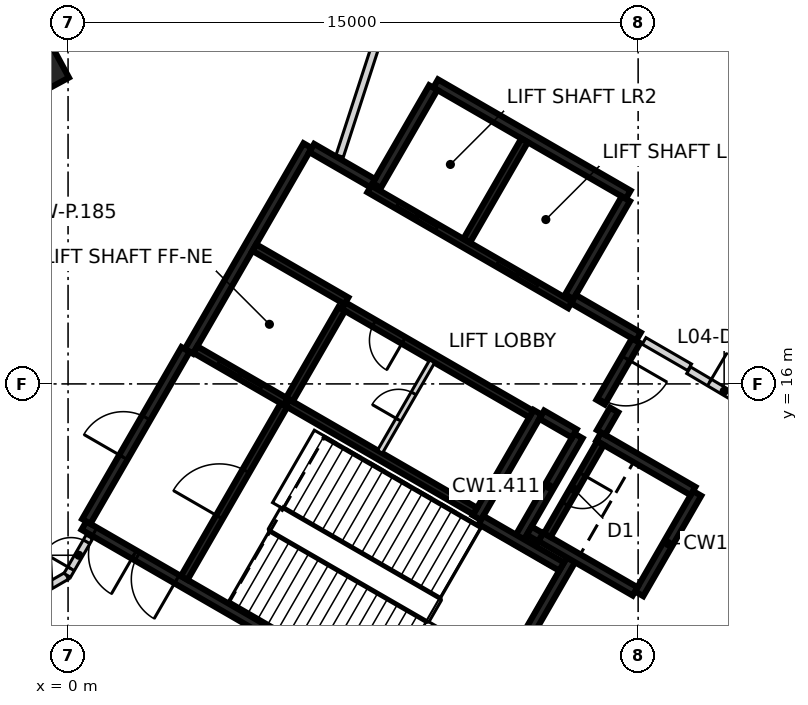
"""IFC4 building model, lengths in metres.
Left out: names, types, materials, properties, quantities, classifications, styles, units other than length and angle.
Written with IfcOpenShell. Run it as: python <this file> out.ifc"""

import sys

from ifc_helpers import new_model, si_unit, direction, frame, frame_2d, origin, origin_2d, place, context, subcontext, project, spatial, rectangle, extrude, element, fill, save


model = new_model("IFC4")
c1 = context("Model", 3, precision=1e-05, world=origin(), true_north=direction((0.0, 1.0)))
c2 = subcontext(c1, "Body", "Model", "MODEL_VIEW")
j1 = project(units=[si_unit("LENGTHUNIT", "METRE"), si_unit("PLANEANGLEUNIT", "RADIAN")], contexts=[c1])
p1 = place(None, origin())
s1 = spatial("IfcSite", under=j1, at=p1, CompositionType="ELEMENT")
p2 = place(p1, origin())
s2 = spatial("IfcBuilding", under=s1, at=p2, CompositionType="ELEMENT")
p3 = place(p2, frame((0.0, 0.0, 24.5)))
s3 = spatial("IfcBuildingStorey", under=s2, at=p3, CompositionType="ELEMENT", Elevation=24.5)
p4 = place(p3, frame((-1.197, 24.423, -0.45), z_axis=(0.0, 0.0, 1.0), x_axis=(-0.476198301069, 0.879337920289, 0.0)))
e1 = element("IfcColumn", 1, at=p4, inside=s3, PredefinedType="COLUMN", context=c2, shape_type="SweptSolid", body=[
    extrude(rectangle(XDim=1.8, YDim=1.8, at=origin_2d()), origin(), (0.0, 0.0, 1.0), 5.05),
])
p5 = place(p3, frame((10.42, 6.498, 0.0), z_axis=(0.0, 0.0, 1.0), x_axis=(-0.866021906294, 0.500006057782, 0.0)))
e2 = element("IfcWall", 2, at=p5, inside=s3, PredefinedType="SHEAR", context=c2, shape_type="SweptSolid", body=[
    extrude(rectangle(XDim=11.55, YDim=0.25, at=frame_2d((5.775, 0.0))), origin(), (0.0, 0.0, 1.0), 4.6),
])
p6 = place(p5, frame((10.025, 0.0, 0.0)))
e3 = element("IfcOpeningElement", 3, at=p6, cuts=e2, PredefinedType="OPENING", context=c2, shape_type="SweptSolid", body=[
    extrude(rectangle(XDim=1.2, YDim=2.1, at=frame_2d((0.6, 1.05))), frame((0.0, 0.135, 0.0), z_axis=(0.0, -1.0, 0.0), x_axis=(1.0, 0.0, 0.0)), (0.0, 0.0, 1.0), 0.27),
])
p7 = place(p5, frame((8.725, 0.0, 0.0)))
e4 = element("IfcOpeningElement", 4, at=p7, cuts=e2, PredefinedType="OPENING", context=c2, shape_type="SweptSolid", body=[
    extrude(rectangle(XDim=1.2, YDim=2.1, at=frame_2d((0.6, 1.05))), frame((0.0, 0.135, 0.0), z_axis=(0.0, -1.0, 0.0), x_axis=(1.0, 0.0, 0.0)), (0.0, 0.0, 1.0), 0.27),
])
p8 = place(p3, frame((3.179, 16.856, 0.0), z_axis=(0.0, 0.0, 1.0), x_axis=(0.500004234368, 0.866022959057, 0.0)))
e5 = element("IfcWall", 5, at=p8, inside=s3, PredefinedType="SHEAR", context=c2, shape_type="SweptSolid", body=[
    extrude(rectangle(XDim=6.25, YDim=0.25, at=frame_2d((3.125, 0.0))), origin(), (0.0, 0.0, 1.0), 4.6),
])
p9 = place(p3, frame((9.673, 23.903, 0.0), z_axis=(0.0, 0.0, 1.0), x_axis=(0.86603616409, -0.499981362141, 0.0)))
e6 = element("IfcWall", 6, at=p9, inside=s3, PredefinedType="SHEAR", context=c2, shape_type="SweptSolid", body=[
    extrude(rectangle(XDim=5.85, YDim=0.25, at=frame_2d((2.925, 0.0))), origin(), (0.0, 0.0, 1.0), 4.6),
])
p10 = place(p3, frame((0.48, 12.381, 0.0), z_axis=(0.0, 0.0, 1.0), x_axis=(0.49999885962, 0.866026062182, 0.0)))
e7 = element("IfcWall", 7, at=p10, inside=s3, PredefinedType="SHEAR", context=c2, shape_type="SweptSolid", body=[
    extrude(rectangle(XDim=5.225, YDim=0.25, at=frame_2d((2.612, 0.0))), origin(), (0.0, 0.0, 1.0), 4.6),
])
p11 = place(p10, frame((1.95, 0.0, 0.0)))
e8 = element("IfcOpeningElement", 8, at=p11, cuts=e7, PredefinedType="OPENING", context=c2, shape_type="SweptSolid", body=[
    extrude(rectangle(XDim=1.2, YDim=2.1, at=frame_2d((0.6, 1.05))), frame((0.0, 0.135, 0.0), z_axis=(0.0, -1.0, 0.0), x_axis=(1.0, 0.0, 0.0)), (0.0, 0.0, 1.0), 0.27),
])
p12 = place(p3, frame((13.238, 11.378, 0.0), z_axis=(0.0, 0.0, 1.0), x_axis=(-0.500008851346, -0.866020293397, 0.0)))
e9 = element("IfcWall", 9, at=p12, inside=s3, PredefinedType="SHEAR", context=c2, shape_type="SweptSolid", body=[
    extrude(rectangle(XDim=5.51, YDim=0.25, at=frame_2d((2.755, 0.0))), origin(), (0.0, 0.0, 1.0), 4.6),
])
p13 = place(p3, frame((12.357, 15.252, 0.0), z_axis=(0.0, 0.0, 1.0), x_axis=(-0.500028443584, -0.866008981251, 0.0)))
e10 = element("IfcWall", 10, at=p13, inside=s3, PredefinedType="SHEAR", context=c2, shape_type="SweptSolid", body=[
    extrude(rectangle(XDim=3.2, YDim=0.25, at=frame_2d((1.6, 0.0))), origin(), (0.0, 0.0, 1.0), 4.6),
])
for number, where, z_axis, x_axis in (
    (11, (8.123, 21.219, 0.0), (0.0, 0.0, 1.0), (0.5, 0.866, 0.0)),
    (12, (14.676, 20.87, 0.0), (0.0, 0.0, 1.0), (-0.5, -0.866, 0.0)),
):
    element("IfcWall", number, at=place(p3, frame(where, z_axis=z_axis, x_axis=x_axis)), inside=s3, PredefinedType="SHEAR", context=c2, shape_type="SweptSolid", body=[
        extrude(rectangle(XDim=2.975, YDim=0.25, at=frame_2d((1.487, 0.0))), origin(), (0.0, 0.0, 1.0), 4.6),
    ])
p14 = place(p3, frame((16.552, 13.119, 0.0), z_axis=(0.0, 0.0, 1.0), x_axis=(-0.499978833458, -0.866037623948, 0.0)))
e13 = element("IfcWall", 13, at=p14, inside=s3, PredefinedType="SHEAR", context=c2, shape_type="SweptSolid", body=[
    extrude(rectangle(XDim=3.05, YDim=0.25, at=frame_2d((1.525, 0.0))), origin(), (0.0, 0.0, 1.0), 4.6),
])
p15 = place(p3, frame((14.918, 10.54, 0.0), z_axis=(0.0, 0.0, 1.0), x_axis=(-0.866063538972, 0.499933942099, 0.0)))
e14 = element("IfcWall", 14, at=p15, inside=s3, PredefinedType="SHEAR", context=c2, shape_type="SweptSolid", body=[
    extrude(rectangle(XDim=2.865, YDim=0.25, at=frame_2d((1.432, 0.0))), origin(), (0.0, 0.0, 1.0), 4.6),
])
p16 = place(p3, frame((13.963, 14.614, 0.0), z_axis=(0.0, 0.0, 1.0), x_axis=(0.866042235819, -0.499970844928, 0.0)))
e15 = element("IfcWall", 15, at=p16, inside=s3, PredefinedType="SHEAR", context=c2, shape_type="SweptSolid", body=[
    extrude(rectangle(XDim=2.865, YDim=0.25, at=frame_2d((1.432, 0.0))), origin(), (0.0, 0.0, 1.0), 4.6),
])
p17 = place(p3, frame((11.888, 11.961, 0.0), z_axis=(0.0, 0.0, 1.0), x_axis=(0.500003324108, 0.866023484601, 0.0)))
e16 = element("IfcWall", 16, at=p17, inside=s3, PredefinedType="SHEAR", context=c2, shape_type="SweptSolid", body=[
    extrude(rectangle(XDim=3.085, YDim=0.25, at=frame_2d((1.542, 0.0))), origin(), (0.0, 0.0, 1.0), 4.6),
])
p18 = place(p3, frame((10.865, 12.418, 0.0), z_axis=(0.0, 0.0, 1.0), x_axis=(0.866026229868, -0.499998569178, 0.0)))
e17 = element("IfcWall", 17, at=p18, inside=s3, PredefinedType="SHEAR", context=c2, shape_type="SweptSolid", body=[
    extrude(rectangle(XDim=2.449, YDim=0.25, at=frame_2d((1.225, 0.0))), origin(), (0.0, 0.0, 1.0), 4.6),
])
p19 = place(p3, frame((13.297, 18.231, 0.0), z_axis=(0.0, 0.0, 1.0), x_axis=(0.866043531843, -0.499968599967, 0.0)))
e18 = element("IfcWall", 18, at=p19, inside=s3, PredefinedType="SHEAR", context=c2, shape_type="SweptSolid", body=[
    extrude(rectangle(XDim=1.975, YDim=0.25, at=frame_2d((0.987, 0.0))), origin(), (0.0, 0.0, 1.0), 4.6),
])
p20 = place(p3, frame((6.413, 22.206, 0.0), z_axis=(0.0, 0.0, 1.0), x_axis=(0.866016279763, -0.500015802937, 0.0)))
e19 = element("IfcWall", 19, at=p20, inside=s3, PredefinedType="SHEAR", context=c2, shape_type="SweptSolid", body=[
    extrude(rectangle(XDim=1.849, YDim=0.25, at=frame_2d((0.925, 0.0))), origin(), (0.0, 0.0, 1.0), 4.6),
])
p21 = place(p3, frame((14.945, 17.135, 0.0), z_axis=(0.0, 0.0, 1.0), x_axis=(-0.499983108224, -0.866035156036, 0.0)))
e20 = element("IfcWall", 20, at=p21, inside=s3, PredefinedType="SHEAR", context=c2, shape_type="SweptSolid", body=[
    extrude(rectangle(XDim=1.865, YDim=0.25, at=frame_2d((0.932, 0.0))), origin(), (0.0, 0.0, 1.0), 4.6),
])
p22 = place(p21, frame((0.535, 0.0, 0.0)))
e21 = element("IfcOpeningElement", 21, at=p22, cuts=e20, PredefinedType="OPENING", context=c2, shape_type="SweptSolid", body=[
    extrude(rectangle(XDim=1.25, YDim=2.1, at=frame_2d((0.625, 1.05))), frame((0.0, 0.135, 0.0), z_axis=(0.0, -1.0, 0.0), x_axis=(1.0, 0.0, 0.0)), (0.0, 0.0, 1.0), 0.27),
])
p23 = place(p3, frame((13.322, 14.695, 0.0), z_axis=(0.0, 0.0, 1.0), x_axis=(-0.866017078145, 0.500014420154, 0.0)))
e22 = element("IfcWall", 22, at=p23, inside=s3, PredefinedType="SHEAR", context=c2, shape_type="SweptSolid", body=[
    extrude(rectangle(XDim=0.989, YDim=0.25, at=frame_2d((0.495, 0.0))), origin(), (0.0, 0.0, 1.0), 4.6),
])
p24 = place(p3, frame((14.368, 15.315, 0.0), z_axis=(0.0, 0.0, 1.0), x_axis=(-0.499897359611, -0.866084655132, 0.0)))
e23 = element("IfcWall", 23, at=p24, inside=s3, PredefinedType="SHEAR", context=c2, shape_type="SweptSolid", body=[
    extrude(rectangle(XDim=0.685, YDim=0.25, at=frame_2d((0.342, 0.0))), origin(), (0.0, 0.0, 1.0), 4.6),
])
p25 = place(p3, frame((12.433, 11.964, 0.0), z_axis=(0.0, 0.0, 1.0), x_axis=(-0.866055875208, 0.499947218231, 0.0)))
e24 = element("IfcWall", 24, at=p25, inside=s3, PredefinedType="SHEAR", context=c2, shape_type="SweptSolid", body=[
    extrude(rectangle(XDim=0.345, YDim=0.25, at=frame_2d((0.172, 0.0))), origin(), (0.0, 0.0, 1.0), 4.6),
])
p26 = place(p3, frame((13.21, 18.08, 0.0), z_axis=(0.0, 0.0, 1.0), x_axis=(-0.866030299012, 0.499991521122, 0.0)))
e25 = element("IfcWall", 25, at=p26, inside=s3, PredefinedType="SHEAR", context=c2, shape_type="SweptSolid", body=[
    extrude(rectangle(XDim=6.1, YDim=0.2, at=frame_2d((3.05, 0.0))), origin(), (0.0, 0.0, 1.0), 4.6),
])
p27 = place(p26, frame((1.0, 0.0, 0.0)))
e26 = element("IfcOpeningElement", 26, at=p27, cuts=e25, PredefinedType="OPENING", context=c2, shape_type="SweptSolid", body=[
    extrude(rectangle(XDim=1.2, YDim=2.1, at=frame_2d((0.6, 1.05))), frame((0.0, 0.11, 0.0), z_axis=(0.0, -1.0, 0.0), x_axis=(1.0, 0.0, 0.0)), (0.0, 0.0, 1.0), 0.22),
])
p28 = place(p26, frame((4.05, 0.0, 0.0)))
e27 = element("IfcOpeningElement", 27, at=p28, cuts=e25, PredefinedType="OPENING", context=c2, shape_type="SweptSolid", body=[
    extrude(rectangle(XDim=1.2, YDim=2.1, at=frame_2d((0.6, 1.05))), frame((0.0, 0.11, 0.0), z_axis=(0.0, -1.0, 0.0), x_axis=(1.0, 0.0, 0.0)), (0.0, 0.0, 1.0), 0.22),
])
p29 = place(p3, frame((5.775, 15.502, 0.0), z_axis=(0.0, 0.0, 1.0), x_axis=(0.866020080793, -0.500009219579, 0.0)))
e28 = element("IfcWall", 28, at=p29, inside=s3, PredefinedType="SHEAR", context=c2, shape_type="SweptSolid", body=[
    extrude(rectangle(XDim=5.699, YDim=0.2, at=frame_2d((2.85, 0.0))), origin(), (0.0, 0.0, 1.0), 4.6),
])
p30 = place(p3, frame((12.185, 15.207, 0.0), z_axis=(0.0, 0.0, 1.0), x_axis=(-0.866020080793, 0.500009219579, 0.0)))
e29 = element("IfcWall", 29, at=p30, inside=s3, PredefinedType="SHEAR", context=c2, shape_type="SweptSolid", body=[
    extrude(rectangle(XDim=5.699, YDim=0.2, at=frame_2d((2.85, 0.0))), origin(), (0.0, 0.0, 1.0), 4.6),
])
p31 = place(p30, frame((3.874, 0.0, 0.0)))
e30 = element("IfcOpeningElement", 30, at=p31, cuts=e29, PredefinedType="OPENING", context=c2, shape_type="SweptSolid", body=[
    extrude(rectangle(XDim=0.9, YDim=2.1, at=frame_2d((0.45, 1.05))), frame((0.0, 0.11, 0.0), z_axis=(0.0, -1.0, 0.0), x_axis=(1.0, 0.0, 0.0)), (0.0, 0.0, 1.0), 0.22),
])
p32 = place(p3, frame((3.057, 10.895, 0.0), z_axis=(0.0, 0.0, 1.0), x_axis=(0.499989418164, 0.866031513124, 0.0)))
e31 = element("IfcWall", 31, at=p32, inside=s3, PredefinedType="SHEAR", context=c2, shape_type="SweptSolid", body=[
    extrude(rectangle(XDim=5.251, YDim=0.2, at=frame_2d((2.625, 0.0))), origin(), (0.0, 0.0, 1.0), 4.6),
])
p33 = place(p32, frame((1.849, 0.0, 0.0)))
e32 = element("IfcOpeningElement", 32, at=p33, cuts=e31, PredefinedType="OPENING", context=c2, shape_type="SweptSolid", body=[
    extrude(rectangle(XDim=1.4, YDim=2.1, at=frame_2d((0.7, 1.05))), frame((0.0, 0.11, 0.0), z_axis=(0.0, -1.0, 0.0), x_axis=(1.0, 0.0, 0.0)), (0.0, 0.0, 1.0), 0.22),
])
p34 = place(p3, frame((10.489, 19.767, 0.0), z_axis=(0.0, 0.0, 1.0), x_axis=(0.499946628782, 0.866056215479, 0.0)))
e33 = element("IfcWall", 33, at=p34, inside=s3, PredefinedType="SHEAR", context=c2, shape_type="SweptSolid", body=[
    extrude(rectangle(XDim=3.048, YDim=0.2, at=frame_2d((1.524, 0.0))), origin(), (0.0, 0.0, 1.0), 4.6),
])
p35 = place(p3, frame((14.008, 14.442, 0.0), z_axis=(0.0, 0.0, 1.0), x_axis=(-0.499986818241, -0.866033014143, 0.0)))
e34 = element("IfcWall", 34, at=p35, inside=s3, PredefinedType="SHEAR", context=c2, shape_type="SweptSolid", body=[
    extrude(rectangle(XDim=2.798, YDim=0.2, at=frame_2d((1.399, 0.0))), origin(), (0.0, 0.0, 1.0), 4.6),
])
p36 = place(p35, frame((0.949, 0.0, 0.0)))
e35 = element("IfcOpeningElement", 35, at=p36, cuts=e34, PredefinedType="OPENING", context=c2, shape_type="SweptSolid", body=[
    extrude(rectangle(XDim=0.9, YDim=2.1, at=frame_2d((0.45, 1.05))), frame((0.0, 0.11, 0.0), z_axis=(0.0, -1.0, 0.0), x_axis=(1.0, 0.0, 0.0)), (0.0, 0.0, 1.0), 0.22),
])
p37 = place(p3, frame((7.199, 17.97, 0.0), z_axis=(0.0, 0.0, 1.0), x_axis=(-0.499968400327, -0.866043647095, 0.0)))
e36 = element("IfcWall", 36, at=p37, inside=s3, PredefinedType="SHEAR", context=c2, shape_type="SweptSolid", body=[
    extrude(rectangle(XDim=2.75, YDim=0.2, at=frame_2d((1.375, 0.0))), origin(), (0.0, 0.0, 1.0), 4.6),
])
p38 = place(p3, frame((5.725, 15.531, 0.0), z_axis=(0.0, 0.0, 1.0), x_axis=(-0.866037306777, 0.499979382845, 0.0)))
e37 = element("IfcWall", 37, at=p38, inside=s3, PredefinedType="SHEAR", context=c2, shape_type="SweptSolid", body=[
    extrude(rectangle(XDim=2.742, YDim=0.2, at=frame_2d((1.371, 0.0))), origin(), (0.0, 0.0, 1.0), 4.6),
])
p39 = place(p38, frame((0.743, 0.0, 0.0)))
e38 = element("IfcOpeningElement", 38, at=p39, cuts=e37, PredefinedType="OPENING", context=c2, shape_type="SweptSolid", body=[
    extrude(rectangle(XDim=1.3, YDim=2.1, at=frame_2d((0.65, 1.05))), frame((0.0, 0.11, 0.0), z_axis=(0.0, -1.0, 0.0), x_axis=(1.0, 0.0, 0.0)), (0.0, 0.0, 1.0), 0.22),
])
p40 = place(p3, frame((4.901, 19.586, 0.0), z_axis=(0.0, 0.0, 1.0), x_axis=(0.866022890907, -0.500004352405, 0.0)))
e39 = element("IfcWall", 39, at=p40, inside=s3, PredefinedType="SHEAR", context=c2, shape_type="SweptSolid", body=[
    extrude(rectangle(XDim=2.799, YDim=0.2, at=frame_2d((1.399, 0.0))), origin(), (0.0, 0.0, 1.0), 4.6),
])
p41 = place(p3, frame((8.207, 14.214, 0.0), z_axis=(0.0, 0.0, 1.0), x_axis=(0.499922376475, 0.866070215109, 0.0)))
e40 = element("IfcWall", 40, at=p41, inside=s3, PredefinedType="PARTITIONING", context=c2, shape_type="SweptSolid", body=[
    extrude(rectangle(XDim=2.749, YDim=0.15, at=frame_2d((1.374, 0.0))), origin(), (0.0, 0.0, 1.0), 4.6),
])
p42 = place(p41, frame((0.974, 0.0, 0.0)))
e41 = element("IfcOpeningElement", 41, at=p42, cuts=e40, PredefinedType="OPENING", context=c2, shape_type="SweptSolid", body=[
    extrude(rectangle(XDim=0.8, YDim=2.1, at=frame_2d((0.4, 1.05))), frame((0.0, 0.085, 0.0), z_axis=(0.0, -1.0, 0.0), x_axis=(1.0, 0.0, 0.0)), (0.0, 0.0, 1.0), 0.17),
])
p43 = place(p3, frame((-8.026, 6.338, 0.0), z_axis=(0.0, 0.0, 1.0), x_axis=(0.866102328946, 0.499866738036, 0.0)))
e42 = element("IfcWall", 42, at=p43, inside=s3, PredefinedType="PARTITIONING", context=c2, shape_type="SweptSolid", body=[
    extrude(rectangle(XDim=9.228, YDim=0.2, at=frame_2d((4.614, 0.0))), origin(), (0.0, 0.0, 1.0), 4.6),
])
p44 = place(p43, frame((6.56, 0.0, 0.0)))
e43 = element("IfcOpeningElement", 43, at=p44, cuts=e42, PredefinedType="OPENING", context=c2, shape_type="SweptSolid", body=[
    extrude(rectangle(XDim=1.0, YDim=2.1, at=frame_2d((0.5, 1.05))), frame((0.0, 0.11, 0.0), z_axis=(0.0, -1.0, 0.0), x_axis=(1.0, 0.0, 0.0)), (0.0, 0.0, 1.0), 0.22),
])
p45 = place(p43, frame((3.331, 0.0, 0.0)))
e44 = element("IfcOpeningElement", 44, at=p45, cuts=e42, PredefinedType="OPENING", context=c2, shape_type="SweptSolid", body=[
    extrude(rectangle(XDim=0.9, YDim=2.1, at=frame_2d((0.45, 1.05))), frame((0.0, 0.11, 0.0), z_axis=(0.0, -1.0, 0.0), x_axis=(1.0, 0.0, 0.0)), (0.0, 0.0, 1.0), 0.22),
])
p46 = place(p3, frame((-0.022, 10.963, 0.0), z_axis=(0.0, 0.0, 1.0), x_axis=(0.499463335884, 0.866335025327, 0.0)))
e45 = element("IfcWall", 45, at=p46, inside=s3, PredefinedType="PARTITIONING", context=c2, shape_type="SweptSolid", body=[
    extrude(rectangle(XDim=1.169, YDim=0.2, at=frame_2d((0.584, 0.0))), origin(), (0.0, 0.0, 1.0), 4.6),
])
p47 = place(p46, frame((0.2, 0.0, 0.0)))
e46 = element("IfcOpeningElement", 46, at=p47, cuts=e45, PredefinedType="OPENING", context=c2, shape_type="SweptSolid", body=[
    extrude(rectangle(XDim=0.82, YDim=2.1, at=frame_2d((0.41, 1.05))), frame((0.0, 0.11, 0.0), z_axis=(0.0, -1.0, 0.0), x_axis=(1.0, 0.0, 0.0)), (0.0, 0.0, 1.0), 0.22),
])
p48 = place(p3, frame((15.156, 17.131, 0.0), z_axis=(0.0, 0.0, 1.0), x_axis=(0.865639364436, -0.500668044455, 0.0)))
e47 = element("IfcWall", 47, at=p48, inside=s3, PredefinedType="PARTITIONING", context=c2, shape_type="SweptSolid", body=[
    extrude(rectangle(XDim=1.385, YDim=0.2, at=frame_2d((0.693, 0.0))), origin(), (0.0, 0.0, 1.0), 4.6),
])
p49 = place(p3, frame((16.33, 16.36, 0.0), z_axis=(0.0, 0.0, 1.0), x_axis=(0.860403612142, -0.5096132104, 0.0)))
e48 = element("IfcWall", 48, at=p49, inside=s3, PredefinedType="PARTITIONING", context=c2, shape_type="SweptSolid", body=[
    extrude(rectangle(XDim=2.512, YDim=0.2, at=frame_2d((1.256, 0.0))), origin(), (0.0, 0.0, 1.0), 4.6),
])
p50 = place(p49, frame((0.635, 0.0, 0.0)))
e49 = element("IfcOpeningElement", 49, at=p50, cuts=e48, PredefinedType="OPENING", context=c2, shape_type="SweptSolid", body=[
    extrude(rectangle(XDim=0.9, YDim=2.1, at=frame_2d((0.45, 1.05))), frame((0.0, 0.11, 0.0), z_axis=(0.0, -1.0, 0.0), x_axis=(1.0, 0.0, 0.0)), (0.0, 0.0, 1.0), 0.22),
])
p51 = place(p3, frame((16.956, 8.54, 0.0), z_axis=(0.0, 0.0, 1.0), x_axis=(0.506799683615, 0.862063849542, 0.0)))
e50 = element("IfcWall", 50, at=p51, inside=s3, PredefinedType="PARTITIONING", context=c2, shape_type="SweptSolid", body=[
    extrude(rectangle(XDim=4.453, YDim=0.2, at=frame_2d((2.227, 0.0))), origin(), (0.0, 0.0, 1.0), 4.6),
])
p52 = place(p3, frame((7.147, 21.996, 0.0), z_axis=(0.0, 0.0, 1.0), x_axis=(0.309008482175, 0.951059282035, 0.0)))
e51 = element("IfcWall", 51, at=p52, inside=s3, PredefinedType="PARTITIONING", context=c2, shape_type="SweptSolid", body=[
    extrude(rectangle(XDim=17.218, YDim=0.2, at=frame_2d((8.609, 0.0))), origin(), (0.0, 0.0, 1.0), 4.6),
])
p53 = place(p39, origin())
e52 = element("IfcDoor", 52, at=p53, inside=s3, OperationType="SLIDING_TO_LEFT", PredefinedType="DOOR", context=c2, shape_type="SweptSolid", body=[
    extrude(rectangle(XDim=1.3, YDim=2.1, at=frame_2d((0.65, 1.05))), frame((0.0, 0.025, 0.0), z_axis=(0.0, -1.0, 0.0), x_axis=(1.0, 0.0, 0.0)), (0.0, 0.0, 1.0), 0.05),
])
fill(e38, e52)
p54 = place(p27, origin())
e53 = element("IfcDoor", 53, at=p54, inside=s3, OperationType="DOUBLE_DOOR_SLIDING", PredefinedType="DOOR", context=c2, shape_type="SweptSolid", body=[
    extrude(rectangle(XDim=1.2, YDim=2.1, at=frame_2d((0.6, 1.05))), frame((0.0, 0.025, 0.0), z_axis=(0.0, -1.0, 0.0), x_axis=(1.0, 0.0, 0.0)), (0.0, 0.0, 1.0), 0.05),
])
fill(e26, e53)
p55 = place(p28, origin())
e54 = element("IfcDoor", 54, at=p55, inside=s3, OperationType="DOUBLE_DOOR_SLIDING", PredefinedType="DOOR", context=c2, shape_type="SweptSolid", body=[
    extrude(rectangle(XDim=1.2, YDim=2.1, at=frame_2d((0.6, 1.05))), frame((0.0, 0.025, 0.0), z_axis=(0.0, -1.0, 0.0), x_axis=(1.0, 0.0, 0.0)), (0.0, 0.0, 1.0), 0.05),
])
fill(e27, e54)
p56 = place(p22, origin())
e55 = element("IfcDoor", 55, at=p56, inside=s3, OperationType="SINGLE_SWING_LEFT", PredefinedType="DOOR", context=c2, shape_type="SweptSolid", body=[
    extrude(rectangle(XDim=1.25, YDim=2.1, at=frame_2d((0.625, 1.05))), frame((0.0, 0.025, 0.0), z_axis=(0.0, -1.0, 0.0), x_axis=(1.0, 0.0, 0.0)), (0.0, 0.0, 1.0), 0.05),
])
fill(e21, e55)
p57 = place(p6, origin())
e56 = element("IfcDoor", 56, at=p57, inside=s3, OperationType="SINGLE_SWING_LEFT", PredefinedType="DOOR", context=c2, shape_type="SweptSolid", body=[
    extrude(rectangle(XDim=1.2, YDim=2.1, at=frame_2d((0.6, 1.05))), frame((0.0, 0.025, 0.0), z_axis=(0.0, -1.0, 0.0), x_axis=(1.0, 0.0, 0.0)), (0.0, 0.0, 1.0), 0.05),
])
fill(e3, e56)
p58 = place(p7, origin())
e57 = element("IfcDoor", 57, at=p58, inside=s3, OperationType="SINGLE_SWING_RIGHT", PredefinedType="DOOR", context=c2, shape_type="SweptSolid", body=[
    extrude(rectangle(XDim=1.2, YDim=2.1, at=frame_2d((0.6, 1.05))), frame((0.0, 0.025, 0.0), z_axis=(0.0, -1.0, 0.0), x_axis=(1.0, 0.0, 0.0)), (0.0, 0.0, 1.0), 0.05),
])
fill(e4, e57)
p59 = place(p33, origin())
e58 = element("IfcDoor", 58, at=p59, inside=s3, OperationType="SINGLE_SWING_LEFT", PredefinedType="DOOR", context=c2, shape_type="SweptSolid", body=[
    extrude(rectangle(XDim=1.4, YDim=2.1, at=frame_2d((0.7, 1.05))), frame((0.0, 0.025, 0.0), z_axis=(0.0, -1.0, 0.0), x_axis=(1.0, 0.0, 0.0)), (0.0, 0.0, 1.0), 0.05),
])
fill(e32, e58)
p60 = place(p31, origin())
e59 = element("IfcDoor", 59, at=p60, inside=s3, OperationType="SINGLE_SWING_RIGHT", PredefinedType="DOOR", context=c2, shape_type="SweptSolid", body=[
    extrude(rectangle(XDim=0.9, YDim=2.1, at=frame_2d((0.45, 1.05))), frame((0.0, 0.025, 0.0), z_axis=(0.0, -1.0, 0.0), x_axis=(1.0, 0.0, 0.0)), (0.0, 0.0, 1.0), 0.05),
])
fill(e30, e59)
p61 = place(p36, origin())
e60 = element("IfcDoor", 60, at=p61, inside=s3, OperationType="SINGLE_SWING_LEFT", PredefinedType="DOOR", context=c2, shape_type="SweptSolid", body=[
    extrude(rectangle(XDim=0.9, YDim=2.1, at=frame_2d((0.45, 1.05))), frame((0.0, 0.025, 0.0), z_axis=(0.0, -1.0, 0.0), x_axis=(1.0, 0.0, 0.0)), (0.0, 0.0, 1.0), 0.05),
])
fill(e35, e60)
p62 = place(p42, origin())
e61 = element("IfcDoor", 61, at=p62, inside=s3, OperationType="SINGLE_SWING_RIGHT", PredefinedType="DOOR", context=c2, shape_type="SweptSolid", body=[
    extrude(rectangle(XDim=0.8, YDim=2.1, at=frame_2d((0.4, 1.05))), frame((0.0, 0.025, 0.0), z_axis=(0.0, -1.0, 0.0), x_axis=(1.0, 0.0, 0.0)), (0.0, 0.0, 1.0), 0.05),
])
fill(e41, e61)
p63 = place(p11, origin())
e62 = element("IfcDoor", 62, at=p63, inside=s3, OperationType="SINGLE_SWING_RIGHT", PredefinedType="DOOR", context=c2, shape_type="SweptSolid", body=[
    extrude(rectangle(XDim=1.2, YDim=2.1, at=frame_2d((0.6, 1.05))), frame((0.0, 0.025, 0.0), z_axis=(0.0, -1.0, 0.0), x_axis=(1.0, 0.0, 0.0)), (0.0, 0.0, 1.0), 0.05),
])
fill(e8, e62)
p64 = place(p50, origin())
e63 = element("IfcDoor", 63, at=p64, inside=s3, OperationType="SINGLE_SWING_LEFT", PredefinedType="DOOR", context=c2, shape_type="SweptSolid", body=[
    extrude(rectangle(XDim=0.9, YDim=2.1, at=frame_2d((0.45, 1.05))), frame((0.0, 0.025, 0.0), z_axis=(0.0, -1.0, 0.0), x_axis=(1.0, 0.0, 0.0)), (0.0, 0.0, 1.0), 0.05),
])
fill(e49, e63)
p65 = place(p47, origin())
e64 = element("IfcDoor", 64, at=p65, inside=s3, OperationType="SINGLE_SWING_LEFT", PredefinedType="DOOR", context=c2, shape_type="SweptSolid", body=[
    extrude(rectangle(XDim=0.82, YDim=2.1, at=frame_2d((0.41, 1.05))), frame((0.0, 0.025, 0.0), z_axis=(0.0, -1.0, 0.0), x_axis=(1.0, 0.0, 0.0)), (0.0, 0.0, 1.0), 0.05),
])
fill(e46, e64)
save(model, sys.argv[1])
